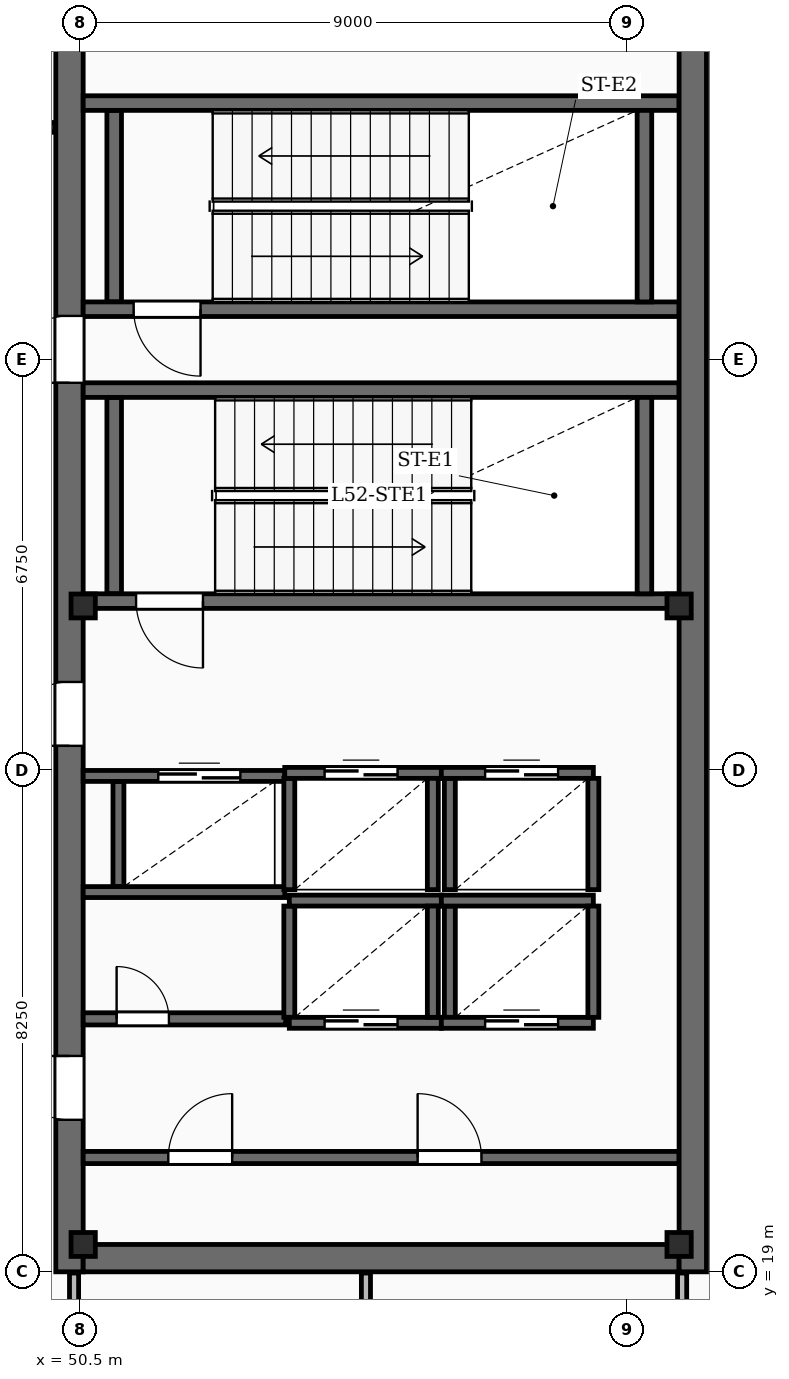
"""IFC4 building model, lengths in metres.
Left out: names, types, materials, properties, quantities, classifications, styles, units other than length and angle.
Written with IfcOpenShell. Run it as: python <this file> out.ifc"""

import sys

from ifc_helpers import new_model, si_unit, direction, frame, frame_2d, origin, origin_2d, place, context, subcontext, project, spatial, rectangle, i_section, extrude, element, fill, save


model = new_model("IFC4")
c1 = context("Model", 3, precision=1e-05, world=origin(), true_north=direction((0.0, 1.0)))
c2 = subcontext(c1, "Body", "Model", "MODEL_VIEW")
j1 = project(units=[si_unit("LENGTHUNIT", "METRE"), si_unit("PLANEANGLEUNIT", "RADIAN")], contexts=[c1])
p1 = place(None, origin())
s1 = spatial("IfcSite", under=j1, at=p1, CompositionType="ELEMENT")
p2 = place(p1, origin())
s2 = spatial("IfcBuilding", under=s1, at=p2, CompositionType="ELEMENT")
p3 = place(p2, frame((0.0, 0.0, 216.15)))
s3 = spatial("IfcBuildingStorey", under=s2, at=p3, CompositionType="ELEMENT", Elevation=216.15)
p4 = place(p3, frame((50.325, 19.0, -0.45), z_axis=(0.0, 0.0, 1.0), x_axis=(0.0, 1.0, 0.0)))
e1 = element("IfcWall", 1, at=p4, inside=s3, PredefinedType="SHEAR", context=c2, shape_type="SweptSolid", body=[
    extrude(rectangle(XDim=20.8, YDim=0.45, at=frame_2d((10.4, 0.0))), origin(), (0.0, 0.0, 1.0), 4.98),
])
p5 = place(p4, frame((2.5, 0.0, 0.45)))
e2 = element("IfcOpeningElement", 2, at=p5, cuts=e1, PredefinedType="OPENING", context=c2, shape_type="SweptSolid", body=[
    extrude(rectangle(XDim=1.05, YDim=2.15, at=frame_2d((0.525, 1.075))), frame((0.0, 0.235, 0.0), z_axis=(0.0, -1.0, 0.0), x_axis=(1.0, 0.0, 0.0)), (0.0, 0.0, 1.0), 0.47),
])
p6 = place(p4, frame((8.65, 0.0, 0.45)))
e3 = element("IfcOpeningElement", 3, at=p6, cuts=e1, PredefinedType="OPENING", context=c2, shape_type="SweptSolid", body=[
    extrude(rectangle(XDim=1.05, YDim=2.15, at=frame_2d((0.525, 1.075))), frame((0.0, 0.235, 0.0), z_axis=(0.0, -1.0, 0.0), x_axis=(1.0, 0.0, 0.0)), (0.0, 0.0, 1.0), 0.47),
])
p7 = place(p4, frame((14.62, 0.0, 0.45)))
e4 = element("IfcOpeningElement", 4, at=p7, cuts=e1, PredefinedType="OPENING", context=c2, shape_type="SweptSolid", body=[
    extrude(rectangle(XDim=1.1, YDim=2.15, at=frame_2d((0.55, 1.075))), frame((0.0, 0.235, 0.0), z_axis=(0.0, -1.0, 0.0), x_axis=(1.0, 0.0, 0.0)), (0.0, 0.0, 1.0), 0.47),
])
p8 = place(p3, frame((60.575, 19.0, -0.45), z_axis=(0.0, 0.0, 1.0), x_axis=(0.0, 1.0, 0.0)))
e5 = element("IfcWall", 5, at=p8, inside=s3, PredefinedType="SHEAR", context=c2, shape_type="SweptSolid", body=[
    extrude(rectangle(XDim=20.8, YDim=0.45, at=frame_2d((10.4, 0.0))), origin(), (0.0, 0.0, 1.0), 4.98),
])
p9 = place(p3, frame((50.55, 19.225, -0.45), z_axis=(0.0, 0.0, 1.0), x_axis=(1.0, 0.0, 0.0)))
e6 = element("IfcWall", 6, at=p9, inside=s3, PredefinedType="SHEAR", context=c2, shape_type="SweptSolid", body=[
    extrude(rectangle(XDim=9.8, YDim=0.45, at=frame_2d((4.9, 0.0))), origin(), (0.0, 0.0, 1.0), 4.98),
])
for number, where, z_axis, x_axis in (
    (7, (50.55, 19.45, -0.45), (0.0, 0.0, 1.0), (1.0, 0.0, 0.0)),
    (8, (60.35, 19.45, -0.45), (0.0, 0.0, 1.0), (1.0, 0.0, 0.0)),
    (9, (50.55, 29.95, -0.45), (0.0, 0.0, 1.0), (1.0, 0.0, 0.0)),
    (10, (60.35, 29.95, -0.45), (0.0, 0.0, 1.0), (1.0, 0.0, 0.0)),
):
    element("IfcColumn", number, at=place(p3, frame(where, z_axis=z_axis, x_axis=x_axis)), inside=s3, PredefinedType="COLUMN", context=c2, shape_type="SweptSolid", body=[
        extrude(i_section(OverallWidth=0.399, OverallDepth=0.393, WebThickness=0.023, FlangeThickness=0.037, FilletRadius=0.02, at=origin_2d()), origin(), (0.0, 0.0, 1.0), 4.98),
    ])
p10 = place(p3, frame((60.35, 30.03, 0.0), z_axis=(0.0, 0.0, 1.0), x_axis=(-1.0, 0.0, 0.0)))
e11 = element("IfcWall", 11, at=p10, inside=s3, PredefinedType="SOLIDWALL", context=c2, shape_type="SweptSolid", body=[
    extrude(rectangle(XDim=9.8, YDim=0.24, at=frame_2d((4.9, 0.0))), origin(), (0.0, 0.0, 1.0), 4.53),
])
p11 = place(p10, frame((7.83, 0.0, 0.0)))
e12 = element("IfcOpeningElement", 12, at=p11, cuts=e11, PredefinedType="OPENING", context=c2, shape_type="SweptSolid", body=[
    extrude(rectangle(XDim=1.1, YDim=2.15, at=frame_2d((0.55, 1.075))), frame((0.0, 0.13, 0.0), z_axis=(0.0, -1.0, 0.0), x_axis=(1.0, 0.0, 0.0)), (0.0, 0.0, 1.0), 0.26),
])
p12 = place(p3, frame((50.55, 33.5, 0.0), z_axis=(0.0, 0.0, 1.0), x_axis=(1.0, 0.0, 0.0)))
e13 = element("IfcWall", 13, at=p12, inside=s3, PredefinedType="SOLIDWALL", context=c2, shape_type="SweptSolid", body=[
    extrude(rectangle(XDim=9.8, YDim=0.24, at=frame_2d((4.9, 0.0))), origin(), (0.0, 0.0, 1.0), 4.53),
])
for number, where, z_axis, x_axis in (
    (14, (51.06, 30.15, 0.0), (0.0, 0.0, 1.0), (0.0, 1.0, 0.0)),
    (15, (59.78, 30.15, 0.0), (0.0, 0.0, 1.0), (0.0, 1.0, 0.0)),
):
    element("IfcWall", number, at=place(p3, frame(where, z_axis=z_axis, x_axis=x_axis)), inside=s3, PredefinedType="SOLIDWALL", context=c2, shape_type="SweptSolid", body=[
        extrude(rectangle(XDim=3.23, YDim=0.24, at=frame_2d((1.615, 0.0))), origin(), (0.0, 0.0, 1.0), 4.53),
    ])
p13 = place(p3, frame((60.35, 34.83, 0.0), z_axis=(0.0, 0.0, 1.0), x_axis=(-1.0, 0.0, 0.0)))
e16 = element("IfcWall", 16, at=p13, inside=s3, PredefinedType="SOLIDWALL", context=c2, shape_type="SweptSolid", body=[
    extrude(rectangle(XDim=9.8, YDim=0.24, at=frame_2d((4.9, 0.0))), origin(), (0.0, 0.0, 1.0), 4.53),
])
p14 = place(p13, frame((7.87, 0.0, 0.0)))
e17 = element("IfcOpeningElement", 17, at=p14, cuts=e16, PredefinedType="OPENING", context=c2, shape_type="SweptSolid", body=[
    extrude(rectangle(XDim=1.1, YDim=2.15, at=frame_2d((0.55, 1.075))), frame((0.0, 0.13, 0.0), z_axis=(0.0, -1.0, 0.0), x_axis=(1.0, 0.0, 0.0)), (0.0, 0.0, 1.0), 0.26),
])
p15 = place(p3, frame((50.55, 38.22, 0.0), z_axis=(0.0, 0.0, 1.0), x_axis=(1.0, 0.0, 0.0)))
e18 = element("IfcWall", 18, at=p15, inside=s3, PredefinedType="SOLIDWALL", context=c2, shape_type="SweptSolid", body=[
    extrude(rectangle(XDim=9.8, YDim=0.24, at=frame_2d((4.9, 0.0))), origin(), (0.0, 0.0, 1.0), 4.53),
])
for number, where, z_axis, x_axis in (
    (19, (51.06, 34.95, 0.0), (0.0, 0.0, 1.0), (0.0, 1.0, 0.0)),
    (20, (59.78, 34.95, 0.0), (0.0, 0.0, 1.0), (0.0, 1.0, 0.0)),
):
    element("IfcWall", number, at=place(p3, frame(where, z_axis=z_axis, x_axis=x_axis)), inside=s3, PredefinedType="SOLIDWALL", context=c2, shape_type="SweptSolid", body=[
        extrude(rectangle(XDim=3.15, YDim=0.24, at=frame_2d((1.575, 0.0))), origin(), (0.0, 0.0, 1.0), 4.53),
    ])
p16 = place(p3, frame((53.94, 25.105, 0.0), z_axis=(0.0, 0.0, 1.0), x_axis=(1.0, 0.0, 0.0)))
e21 = element("IfcWall", 21, at=p16, inside=s3, PredefinedType="SOLIDWALL", context=c2, shape_type="SweptSolid", body=[
    extrude(rectangle(XDim=2.5, YDim=0.18, at=frame_2d((1.25, 0.0))), origin(), (0.0, 0.0, 1.0), 4.53),
])
p17 = place(p3, frame((53.94, 23.095, 0.0), z_axis=(0.0, 0.0, 1.0), x_axis=(1.0, 0.0, 0.0)))
e22 = element("IfcWall", 22, at=p17, inside=s3, PredefinedType="SOLIDWALL", context=c2, shape_type="SweptSolid", body=[
    extrude(rectangle(XDim=2.5, YDim=0.18, at=frame_2d((1.25, 0.0))), origin(), (0.0, 0.0, 1.0), 4.53),
])
p18 = place(p17, frame((0.58, 0.0, 0.0)))
e23 = element("IfcOpeningElement", 23, at=p18, cuts=e22, PredefinedType="OPENING", context=c2, shape_type="SweptSolid", body=[
    extrude(rectangle(XDim=1.2, YDim=2.2, at=frame_2d((0.6, 1.1))), frame((0.0, 0.1, 0.0), z_axis=(0.0, -1.0, 0.0), x_axis=(1.0, 0.0, 0.0)), (0.0, 0.0, 1.0), 0.2),
])
for number, where, z_axis, x_axis in (
    (24, (53.94, 23.185, 0.0), (0.0, 0.0, 1.0), (0.0, 1.0, 0.0)),
    (25, (56.3, 23.185, 0.0), (0.0, 0.0, 1.0), (0.0, 1.0, 0.0)),
):
    element("IfcWall", number, at=place(p3, frame(where, z_axis=z_axis, x_axis=x_axis)), inside=s3, PredefinedType="SOLIDWALL", context=c2, shape_type="SweptSolid", body=[
        extrude(rectangle(XDim=1.83, YDim=0.18, at=frame_2d((0.915, 0.0))), origin(), (0.0, 0.0, 1.0), 4.53),
    ])
p19 = place(p3, frame((56.44, 25.105, 0.0), z_axis=(0.0, 0.0, 1.0), x_axis=(1.0, 0.0, 0.0)))
e26 = element("IfcWall", 26, at=p19, inside=s3, PredefinedType="SOLIDWALL", context=c2, shape_type="SweptSolid", body=[
    extrude(rectangle(XDim=2.5, YDim=0.18, at=frame_2d((1.25, 0.0))), origin(), (0.0, 0.0, 1.0), 4.53),
])
p20 = place(p3, frame((56.44, 23.095, 0.0), z_axis=(0.0, 0.0, 1.0), x_axis=(1.0, 0.0, 0.0)))
e27 = element("IfcWall", 27, at=p20, inside=s3, PredefinedType="SOLIDWALL", context=c2, shape_type="SweptSolid", body=[
    extrude(rectangle(XDim=2.5, YDim=0.18, at=frame_2d((1.25, 0.0))), origin(), (0.0, 0.0, 1.0), 4.53),
])
p21 = place(p20, frame((0.72, 0.0, 0.0)))
e28 = element("IfcOpeningElement", 28, at=p21, cuts=e27, PredefinedType="OPENING", context=c2, shape_type="SweptSolid", body=[
    extrude(rectangle(XDim=1.2, YDim=2.2, at=frame_2d((0.6, 1.1))), frame((0.0, 0.1, 0.0), z_axis=(0.0, -1.0, 0.0), x_axis=(1.0, 0.0, 0.0)), (0.0, 0.0, 1.0), 0.2),
])
for number, where, z_axis, x_axis in (
    (29, (56.58, 23.185, 0.0), (0.0, 0.0, 1.0), (0.0, 1.0, 0.0)),
    (30, (58.94, 23.185, 0.0), (0.0, 0.0, 1.0), (0.0, 1.0, 0.0)),
):
    element("IfcWall", number, at=place(p3, frame(where, z_axis=z_axis, x_axis=x_axis)), inside=s3, PredefinedType="SOLIDWALL", context=c2, shape_type="SweptSolid", body=[
        extrude(rectangle(XDim=1.83, YDim=0.18, at=frame_2d((0.915, 0.0))), origin(), (0.0, 0.0, 1.0), 4.53),
    ])
p22 = place(p3, frame((53.865, 27.205, 0.0), z_axis=(0.0, 0.0, 1.0), x_axis=(1.0, 0.0, 0.0)))
e31 = element("IfcWall", 31, at=p22, inside=s3, PredefinedType="SOLIDWALL", context=c2, shape_type="SweptSolid", body=[
    extrude(rectangle(XDim=2.575, YDim=0.18, at=frame_2d((1.288, 0.0))), origin(), (0.0, 0.0, 1.0), 4.53),
])
p23 = place(p22, frame((0.655, 0.0, 0.0)))
e32 = element("IfcOpeningElement", 32, at=p23, cuts=e31, PredefinedType="OPENING", context=c2, shape_type="SweptSolid", body=[
    extrude(rectangle(XDim=1.2, YDim=2.2, at=frame_2d((0.6, 1.1))), frame((0.0, 0.1, 0.0), z_axis=(0.0, -1.0, 0.0), x_axis=(1.0, 0.0, 0.0)), (0.0, 0.0, 1.0), 0.2),
])
for number, where, z_axis, x_axis in (
    (33, (53.94, 25.285, 0.0), (0.0, 0.0, 1.0), (0.0, 1.0, 0.0)),
    (34, (56.3, 25.285, 0.0), (0.0, 0.0, 1.0), (0.0, 1.0, 0.0)),
):
    element("IfcWall", number, at=place(p3, frame(where, z_axis=z_axis, x_axis=x_axis)), inside=s3, PredefinedType="SOLIDWALL", context=c2, shape_type="SweptSolid", body=[
        extrude(rectangle(XDim=1.83, YDim=0.18, at=frame_2d((0.915, 0.0))), origin(), (0.0, 0.0, 1.0), 4.53),
    ])
p24 = place(p3, frame((56.44, 27.205, 0.0), z_axis=(0.0, 0.0, 1.0), x_axis=(1.0, 0.0, 0.0)))
e35 = element("IfcWall", 35, at=p24, inside=s3, PredefinedType="SOLIDWALL", context=c2, shape_type="SweptSolid", body=[
    extrude(rectangle(XDim=2.5, YDim=0.18, at=frame_2d((1.25, 0.0))), origin(), (0.0, 0.0, 1.0), 4.53),
])
p25 = place(p24, frame((0.72, 0.0, 0.0)))
e36 = element("IfcOpeningElement", 36, at=p25, cuts=e35, PredefinedType="OPENING", context=c2, shape_type="SweptSolid", body=[
    extrude(rectangle(XDim=1.2, YDim=2.2, at=frame_2d((0.6, 1.1))), frame((0.0, 0.1, 0.0), z_axis=(0.0, -1.0, 0.0), x_axis=(1.0, 0.0, 0.0)), (0.0, 0.0, 1.0), 0.2),
])
for number, where, z_axis, x_axis in (
    (37, (56.58, 25.285, 0.0), (0.0, 0.0, 1.0), (0.0, 1.0, 0.0)),
    (38, (58.94, 25.285, 0.0), (0.0, 0.0, 1.0), (0.0, 1.0, 0.0)),
):
    element("IfcWall", number, at=place(p3, frame(where, z_axis=z_axis, x_axis=x_axis)), inside=s3, PredefinedType="SOLIDWALL", context=c2, shape_type="SweptSolid", body=[
        extrude(rectangle(XDim=1.83, YDim=0.18, at=frame_2d((0.915, 0.0))), origin(), (0.0, 0.0, 1.0), 4.53),
    ])
p26 = place(p3, frame((50.55, 27.155, 0.0), z_axis=(0.0, 0.0, 1.0), x_axis=(1.0, 0.0, 0.0)))
e39 = element("IfcWall", 39, at=p26, inside=s3, PredefinedType="SOLIDWALL", context=c2, shape_type="SweptSolid", body=[
    extrude(rectangle(XDim=3.315, YDim=0.18, at=frame_2d((1.657, 0.0))), origin(), (0.0, 0.0, 1.0), 4.53),
])
p27 = place(p26, frame((1.235, 0.0, 0.0)))
e40 = element("IfcOpeningElement", 40, at=p27, cuts=e39, PredefinedType="OPENING", context=c2, shape_type="SweptSolid", body=[
    extrude(rectangle(XDim=1.35, YDim=2.3, at=frame_2d((0.675, 1.15))), frame((0.0, 0.1, 0.0), z_axis=(0.0, -1.0, 0.0), x_axis=(1.0, 0.0, 0.0)), (0.0, 0.0, 1.0), 0.2),
])
p28 = place(p3, frame((50.55, 25.245, 0.0), z_axis=(0.0, 0.0, 1.0), x_axis=(1.0, 0.0, 0.0)))
e41 = element("IfcWall", 41, at=p28, inside=s3, PredefinedType="SOLIDWALL", context=c2, shape_type="SweptSolid", body=[
    extrude(rectangle(XDim=3.315, YDim=0.18, at=frame_2d((1.657, 0.0))), origin(), (0.0, 0.0, 1.0), 4.53),
])
p29 = place(p3, frame((51.13, 25.335, 0.0), z_axis=(0.0, 0.0, 1.0), x_axis=(0.0, 1.0, 0.0)))
e42 = element("IfcWall", 42, at=p29, inside=s3, PredefinedType="SOLIDWALL", context=c2, shape_type="SweptSolid", body=[
    extrude(rectangle(XDim=1.73, YDim=0.18, at=frame_2d((0.865, 0.0))), origin(), (0.0, 0.0, 1.0), 4.53),
])
p30 = place(p3, frame((50.55, 20.88, 0.0), z_axis=(0.0, 0.0, 1.0), x_axis=(1.0, 0.0, 0.0)))
e43 = element("IfcWall", 43, at=p30, inside=s3, PredefinedType="SOLIDWALL", context=c2, shape_type="SweptSolid", body=[
    extrude(rectangle(XDim=9.8, YDim=0.2, at=frame_2d((4.9, 0.0))), origin(), (0.0, 0.0, 1.0), 3.59),
])
p31 = place(p30, frame((1.4, 0.0, 0.0)))
e44 = element("IfcOpeningElement", 44, at=p31, cuts=e43, PredefinedType="OPENING", context=c2, shape_type="SweptSolid", body=[
    extrude(rectangle(XDim=1.05, YDim=2.15, at=frame_2d((0.525, 1.075))), frame((0.0, 0.11, 0.0), z_axis=(0.0, -1.0, 0.0), x_axis=(1.0, 0.0, 0.0)), (0.0, 0.0, 1.0), 0.22),
])
p32 = place(p30, frame((5.5, 0.0, 0.0)))
e45 = element("IfcOpeningElement", 45, at=p32, cuts=e43, PredefinedType="OPENING", context=c2, shape_type="SweptSolid", body=[
    extrude(rectangle(XDim=1.05, YDim=2.15, at=frame_2d((0.525, 1.075))), frame((0.0, 0.11, 0.0), z_axis=(0.0, -1.0, 0.0), x_axis=(1.0, 0.0, 0.0)), (0.0, 0.0, 1.0), 0.22),
])
p33 = place(p3, frame((50.55, 23.16, 0.0), z_axis=(0.0, 0.0, 1.0), x_axis=(1.0, 0.0, 0.0)))
e46 = element("IfcWall", 46, at=p33, inside=s3, PredefinedType="SOLIDWALL", context=c2, shape_type="SweptSolid", body=[
    extrude(rectangle(XDim=3.33, YDim=0.2, at=frame_2d((1.665, 0.0))), origin(), (0.0, 0.0, 1.0), 3.59),
])
p34 = place(p33, frame((0.55, 0.0, 0.0)))
e47 = element("IfcOpeningElement", 47, at=p34, cuts=e46, PredefinedType="OPENING", context=c2, shape_type="SweptSolid", body=[
    extrude(rectangle(XDim=0.86, YDim=2.05, at=frame_2d((0.43, 1.025))), frame((0.0, 0.11, 0.0), z_axis=(0.0, -1.0, 0.0), x_axis=(1.0, 0.0, 0.0)), (0.0, 0.0, 1.0), 0.22),
])
for number, where, z_axis, x_axis in (
    (48, (55.2, 15.4, 0.0), (0.0, 0.0, 1.0), (0.0, 1.0, 0.0)),
    (49, (50.4, 15.4, 0.0), (0.0, 0.0, 1.0), (0.0, 1.0, 0.0)),
    (50, (60.4, 15.4, 0.0), (0.0, 0.0, 1.0), (0.0, 1.0, 0.0)),
):
    element("IfcWall", number, at=place(p3, frame(where, z_axis=z_axis, x_axis=x_axis)), inside=s3, PredefinedType="PARTITIONING", context=c2, shape_type="SweptSolid", body=[
        extrude(rectangle(XDim=3.58, YDim=0.15, at=frame_2d((1.79, 0.0))), origin(), (0.0, 0.0, 1.0), 3.59),
    ])
p35 = place(p3, frame((24.82, 37.82, 0.0), z_axis=(0.0, 0.0, 1.0), x_axis=(1.0, 0.0, 0.0)))
e51 = element("IfcWall", 51, at=p35, inside=s3, PredefinedType="PARTITIONING", context=c2, shape_type="SweptSolid", body=[
    extrude(rectangle(XDim=25.26, YDim=0.16, at=frame_2d((12.63, 0.0))), origin(), (0.0, 0.0, 1.0), 3.59),
])
p36 = place(p35, frame((3.5, 0.0, 0.0)))
e52 = element("IfcOpeningElement", 52, at=p36, cuts=e51, PredefinedType="OPENING", context=c2, shape_type="SweptSolid", body=[
    extrude(rectangle(XDim=1.6, YDim=2.15, at=frame_2d((0.8, 1.075))), frame((0.0, 0.09, 0.0), z_axis=(0.0, -1.0, 0.0), x_axis=(1.0, 0.0, 0.0)), (0.0, 0.0, 1.0), 0.18),
])
p37 = place(p35, frame((17.5, 0.0, 0.0)))
e53 = element("IfcOpeningElement", 53, at=p37, cuts=e51, PredefinedType="OPENING", context=c2, shape_type="SweptSolid", body=[
    extrude(rectangle(XDim=1.6, YDim=2.15, at=frame_2d((0.8, 1.075))), frame((0.0, 0.09, 0.0), z_axis=(0.0, -1.0, 0.0), x_axis=(1.0, 0.0, 0.0)), (0.0, 0.0, 1.0), 0.18),
])
p38 = place(p5, origin())
e54 = element("IfcDoor", 54, at=p38, inside=s3, OperationType="SINGLE_SWING_RIGHT", PredefinedType="DOOR", context=c2, shape_type="SweptSolid", body=[
    extrude(rectangle(XDim=1.05, YDim=2.15, at=frame_2d((0.525, 1.075))), frame((0.0, 0.025, 0.0), z_axis=(0.0, -1.0, 0.0), x_axis=(1.0, 0.0, 0.0)), (0.0, 0.0, 1.0), 0.05),
])
fill(e2, e54)
p39 = place(p6, origin())
e55 = element("IfcDoor", 55, at=p39, inside=s3, OperationType="SINGLE_SWING_LEFT", PredefinedType="DOOR", context=c2, shape_type="SweptSolid", body=[
    extrude(rectangle(XDim=1.05, YDim=2.15, at=frame_2d((0.525, 1.075))), frame((0.0, 0.025, 0.0), z_axis=(0.0, -1.0, 0.0), x_axis=(1.0, 0.0, 0.0)), (0.0, 0.0, 1.0), 0.05),
])
fill(e3, e55)
p40 = place(p7, origin())
e56 = element("IfcDoor", 56, at=p40, inside=s3, OperationType="SINGLE_SWING_LEFT", PredefinedType="DOOR", context=c2, shape_type="SweptSolid", body=[
    extrude(rectangle(XDim=1.1, YDim=2.15, at=frame_2d((0.55, 1.075))), frame((0.0, 0.025, 0.0), z_axis=(0.0, -1.0, 0.0), x_axis=(1.0, 0.0, 0.0)), (0.0, 0.0, 1.0), 0.05),
])
fill(e4, e56)
p41 = place(p11, origin())
e57 = element("IfcDoor", 57, at=p41, inside=s3, OperationType="SINGLE_SWING_LEFT", PredefinedType="DOOR", context=c2, shape_type="SweptSolid", body=[
    extrude(rectangle(XDim=1.1, YDim=2.15, at=frame_2d((0.55, 1.075))), frame((0.0, 0.025, 0.0), z_axis=(0.0, -1.0, 0.0), x_axis=(1.0, 0.0, 0.0)), (0.0, 0.0, 1.0), 0.05),
])
fill(e12, e57)
p42 = place(p14, origin())
e58 = element("IfcDoor", 58, at=p42, inside=s3, OperationType="SINGLE_SWING_LEFT", PredefinedType="DOOR", context=c2, shape_type="SweptSolid", body=[
    extrude(rectangle(XDim=1.1, YDim=2.15, at=frame_2d((0.55, 1.075))), frame((0.0, 0.025, 0.0), z_axis=(0.0, -1.0, 0.0), x_axis=(1.0, 0.0, 0.0)), (0.0, 0.0, 1.0), 0.05),
])
fill(e17, e58)
p43 = place(p18, origin())
e59 = element("IfcDoor", 59, at=p43, inside=s3, OperationType="DOUBLE_DOOR_SLIDING", PredefinedType="DOOR", context=c2, shape_type="SweptSolid", body=[
    extrude(rectangle(XDim=1.2, YDim=2.2, at=frame_2d((0.6, 1.1))), frame((0.0, 0.025, 0.0), z_axis=(0.0, -1.0, 0.0), x_axis=(1.0, 0.0, 0.0)), (0.0, 0.0, 1.0), 0.05),
])
fill(e23, e59)
p44 = place(p21, origin())
e60 = element("IfcDoor", 60, at=p44, inside=s3, OperationType="DOUBLE_DOOR_SLIDING", PredefinedType="DOOR", context=c2, shape_type="SweptSolid", body=[
    extrude(rectangle(XDim=1.2, YDim=2.2, at=frame_2d((0.6, 1.1))), frame((0.0, 0.025, 0.0), z_axis=(0.0, -1.0, 0.0), x_axis=(1.0, 0.0, 0.0)), (0.0, 0.0, 1.0), 0.05),
])
fill(e28, e60)
p45 = place(p23, origin())
e61 = element("IfcDoor", 61, at=p45, inside=s3, OperationType="DOUBLE_DOOR_SLIDING", PredefinedType="DOOR", context=c2, shape_type="SweptSolid", body=[
    extrude(rectangle(XDim=1.2, YDim=2.2, at=frame_2d((0.6, 1.1))), frame((0.0, 0.025, 0.0), z_axis=(0.0, -1.0, 0.0), x_axis=(1.0, 0.0, 0.0)), (0.0, 0.0, 1.0), 0.05),
])
fill(e32, e61)
p46 = place(p25, origin())
e62 = element("IfcDoor", 62, at=p46, inside=s3, OperationType="DOUBLE_DOOR_SLIDING", PredefinedType="DOOR", context=c2, shape_type="SweptSolid", body=[
    extrude(rectangle(XDim=1.2, YDim=2.2, at=frame_2d((0.6, 1.1))), frame((0.0, 0.025, 0.0), z_axis=(0.0, -1.0, 0.0), x_axis=(1.0, 0.0, 0.0)), (0.0, 0.0, 1.0), 0.05),
])
fill(e36, e62)
p47 = place(p27, origin())
e63 = element("IfcDoor", 63, at=p47, inside=s3, OperationType="DOUBLE_DOOR_SLIDING", PredefinedType="DOOR", context=c2, shape_type="SweptSolid", body=[
    extrude(rectangle(XDim=1.35, YDim=2.3, at=frame_2d((0.675, 1.15))), frame((0.0, 0.025, 0.0), z_axis=(0.0, -1.0, 0.0), x_axis=(1.0, 0.0, 0.0)), (0.0, 0.0, 1.0), 0.05),
])
fill(e40, e63)
p48 = place(p31, origin())
e64 = element("IfcDoor", 64, at=p48, inside=s3, OperationType="SINGLE_SWING_RIGHT", PredefinedType="DOOR", context=c2, shape_type="SweptSolid", body=[
    extrude(rectangle(XDim=1.05, YDim=2.15, at=frame_2d((0.525, 1.075))), frame((0.0, 0.025, 0.0), z_axis=(0.0, -1.0, 0.0), x_axis=(1.0, 0.0, 0.0)), (0.0, 0.0, 1.0), 0.05),
])
fill(e44, e64)
p49 = place(p32, origin())
e65 = element("IfcDoor", 65, at=p49, inside=s3, OperationType="SINGLE_SWING_LEFT", PredefinedType="DOOR", context=c2, shape_type="SweptSolid", body=[
    extrude(rectangle(XDim=1.05, YDim=2.15, at=frame_2d((0.525, 1.075))), frame((0.0, 0.025, 0.0), z_axis=(0.0, -1.0, 0.0), x_axis=(1.0, 0.0, 0.0)), (0.0, 0.0, 1.0), 0.05),
])
fill(e45, e65)
p50 = place(p34, origin())
e66 = element("IfcDoor", 66, at=p50, inside=s3, OperationType="SINGLE_SWING_LEFT", PredefinedType="DOOR", context=c2, shape_type="SweptSolid", body=[
    extrude(rectangle(XDim=0.86, YDim=2.05, at=frame_2d((0.43, 1.025))), frame((0.0, 0.025, 0.0), z_axis=(0.0, -1.0, 0.0), x_axis=(1.0, 0.0, 0.0)), (0.0, 0.0, 1.0), 0.05),
])
fill(e47, e66)
save(model, sys.argv[1])
